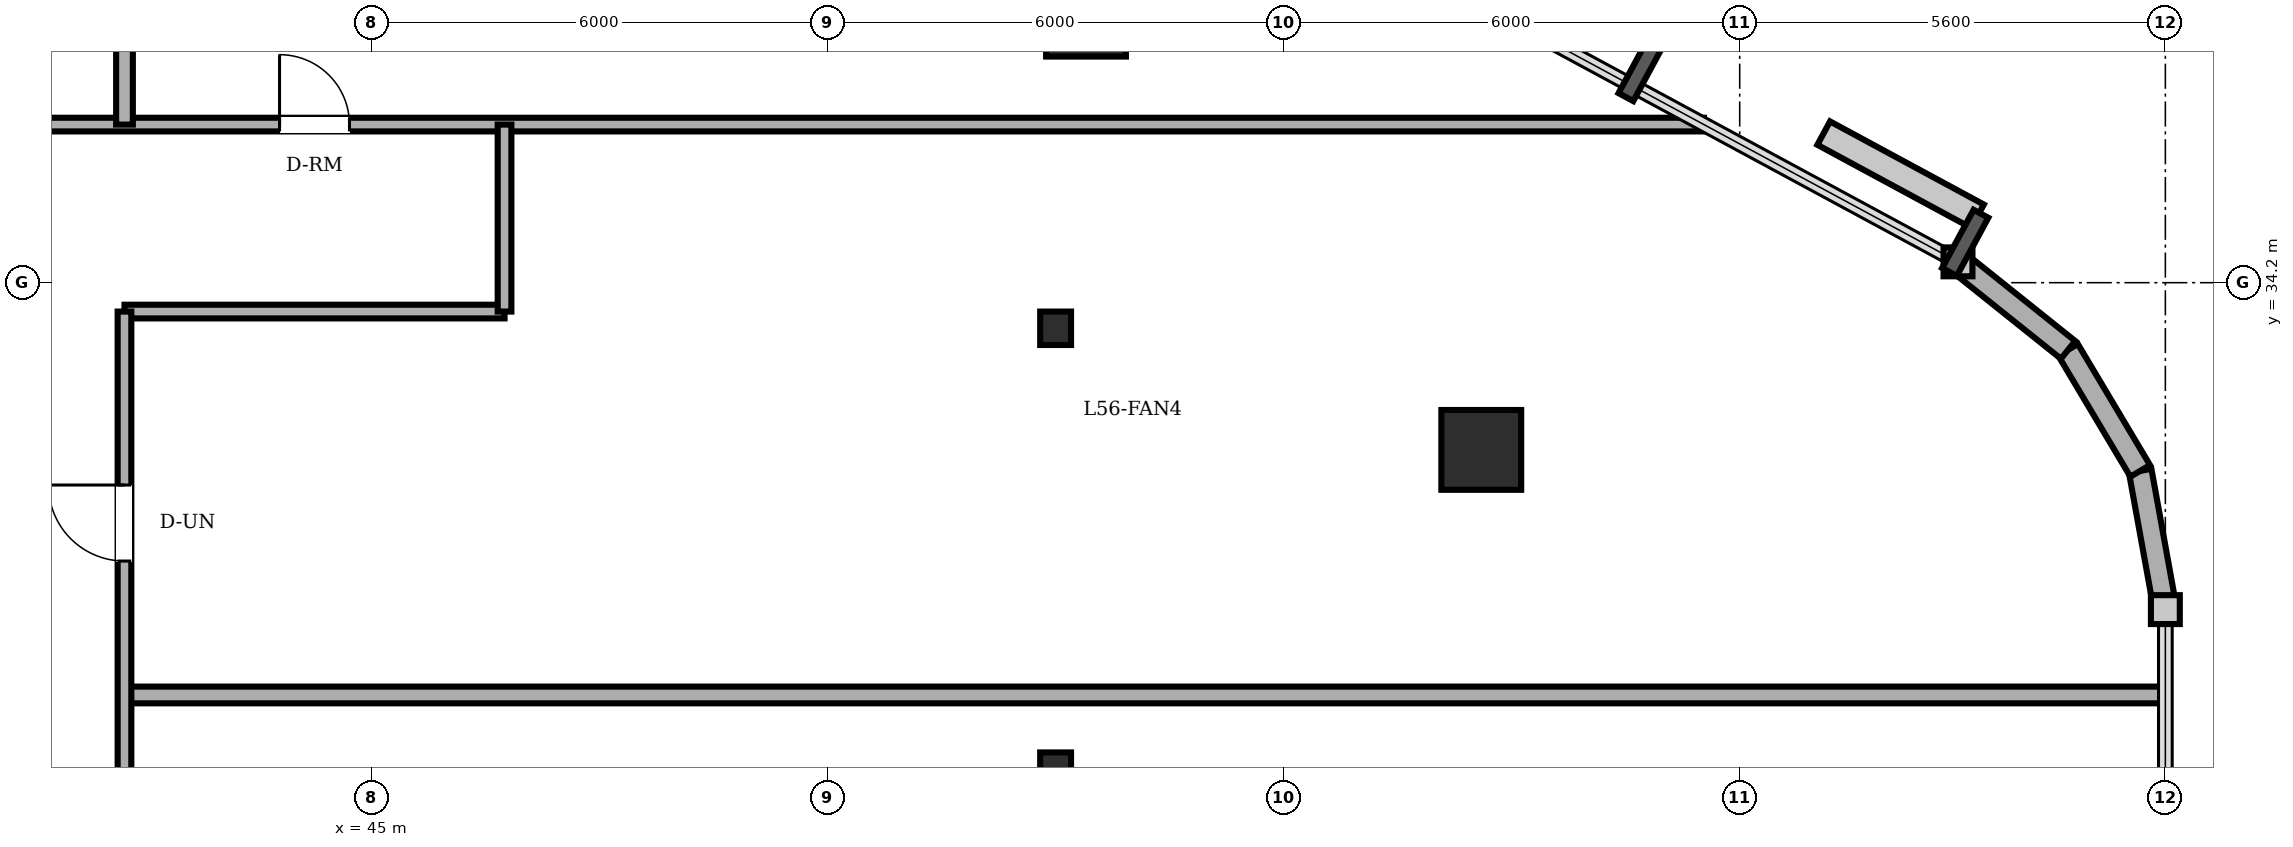
"""IFC4 building model, lengths in metres.
Left out: names, types, materials, properties, quantities, classifications, styles, units other than length and angle.
Written with IfcOpenShell. Run it as: python <this file> out.ifc"""

import sys

from ifc_helpers import new_model, si_unit, direction, frame, frame_2d, origin, origin_2d, place, context, subcontext, project, spatial, rectangle, circle, i_section, extrude, element, fill, save


model = new_model("IFC4")
c1 = context("Model", 3, precision=1e-05, world=origin(), true_north=direction((0.0, 1.0)))
c2 = subcontext(c1, "Body", "Model", "MODEL_VIEW")
j1 = project(units=[si_unit("LENGTHUNIT", "METRE"), si_unit("PLANEANGLEUNIT", "RADIAN")], contexts=[c1])
p1 = place(None, origin())
s1 = spatial("IfcSite", under=j1, at=p1, CompositionType="ELEMENT")
p2 = place(p1, origin())
s2 = spatial("IfcBuilding", under=s1, at=p2, CompositionType="ELEMENT")
p3 = place(p2, frame((0.0, 0.0, 215.7)))
s3 = spatial("IfcBuildingStorey", under=s2, at=p3, CompositionType="ELEMENT", Elevation=215.7)
for number, where, z_axis, x_axis in (
    (1, (59.6, 32.0, 0.0), (0.0, 0.0, 1.0), (1.0, 0.0, 0.0)),
    (2, (54.4, 37.7, 0.0), (0.0, 0.0, 1.0), (1.0, 0.0, 0.0)),
):
    element("IfcColumn", number, at=place(p3, frame(where, z_axis=z_axis, x_axis=x_axis)), inside=s3, PredefinedType="COLUMN", context=c2, shape_type="SweptSolid", body=[
        extrude(circle(Radius=0.525, at=origin_2d()), origin(), (0.0, 0.0, 1.0), 3.6),
    ])
for number, where, z_axis, x_axis in (
    (3, (54.0, 27.8, 0.0), (0.0, 0.0, 1.0), (1.0, 0.0, 0.0)),
    (4, (54.0, 33.6, 0.0), (0.0, 0.0, 1.0), (1.0, 0.0, 0.0)),
):
    element("IfcColumn", number, at=place(p3, frame(where, z_axis=z_axis, x_axis=x_axis)), inside=s3, PredefinedType="COLUMN", context=c2, shape_type="SweptSolid", body=[
        extrude(i_section(OverallWidth=0.406, OverallDepth=0.44, WebThickness=0.024, FlangeThickness=0.039, FilletRadius=0.015, at=origin_2d()), origin(), (0.0, 0.0, 1.0), 3.6),
    ])
p4 = place(p3, frame((68.6, 29.899, 0.0), z_axis=(0.0, 0.0, 1.0), x_axis=(-0.178468469252, 0.983945631365, 0.0)))
e5 = element("IfcWall", 5, at=p4, inside=s3, PredefinedType="SOLIDWALL", context=c2, shape_type="SweptSolid", body=[
    extrude(rectangle(XDim=1.855, YDim=0.3, at=frame_2d((0.927, 0.0))), origin(), (0.0, 0.0, 1.0), 3.4),
])
p5 = place(p3, frame((68.269, 31.724, 0.0), z_axis=(0.0, 0.0, 1.0), x_axis=(-0.512072018927, 0.858942516955, 0.0)))
e6 = element("IfcWall", 6, at=p5, inside=s3, PredefinedType="SOLIDWALL", context=c2, shape_type="SweptSolid", body=[
    extrude(rectangle(XDim=1.853, YDim=0.3, at=frame_2d((0.927, 0.0))), origin(), (0.0, 0.0, 1.0), 3.4),
])
p6 = place(p3, frame((67.32, 33.316, 0.0), z_axis=(0.0, 0.0, 1.0), x_axis=(-0.780920189257, 0.624630817372, 0.0)))
e7 = element("IfcWall", 7, at=p6, inside=s3, PredefinedType="SOLIDWALL", context=c2, shape_type="SweptSolid", body=[
    extrude(rectangle(XDim=1.854, YDim=0.3, at=frame_2d((0.927, 0.0))), origin(), (0.0, 0.0, 1.0), 3.4),
])
p7 = place(p3, frame((41.75, 28.776, 0.0), z_axis=(0.0, 0.0, 1.0), x_axis=(1.0, 0.0, 0.0)))
e8 = element("IfcWall", 8, at=p7, inside=s3, PredefinedType="PARTITIONING", context=c2, shape_type="SweptSolid", body=[
    extrude(rectangle(XDim=26.85, YDim=0.22, at=frame_2d((13.425, 0.0))), origin(), (0.0, 0.0, 1.0), 3.4),
])
p8 = place(p3, frame((41.75, 33.82, 0.0), z_axis=(0.0, 0.0, 1.0), x_axis=(1.0, 0.0, 0.0)))
e9 = element("IfcWall", 9, at=p8, inside=s3, PredefinedType="PARTITIONING", context=c2, shape_type="SweptSolid", body=[
    extrude(rectangle(XDim=5.0, YDim=0.18, at=frame_2d((2.5, 0.0))), origin(), (0.0, 0.0, 1.0), 2.982),
])
p9 = place(p3, frame((17.677, 36.28, 0.0), z_axis=(0.0, 0.0, 1.0), x_axis=(1.0, 0.0, 0.0)))
e10 = element("IfcWall", 10, at=p9, inside=s3, PredefinedType="PARTITIONING", context=c2, shape_type="SweptSolid", body=[
    extrude(rectangle(XDim=44.853, YDim=0.18, at=frame_2d((22.427, 0.0))), origin(), (0.0, 0.0, 1.0), 3.4),
])
p10 = place(p9, frame((9.573, 0.0, 0.0)))
e11 = element("IfcOpeningElement", 11, at=p10, cuts=e10, PredefinedType="OPENING", context=c2, shape_type="SweptSolid", body=[
    extrude(rectangle(XDim=0.9, YDim=2.1, at=frame_2d((0.45, 1.05))), frame((0.0, 0.1, 0.0), z_axis=(0.0, -1.0, 0.0), x_axis=(1.0, 0.0, 0.0)), (0.0, 0.0, 1.0), 0.2),
])
p11 = place(p9, frame((13.193, 0.0, 0.0)))
e12 = element("IfcOpeningElement", 12, at=p11, cuts=e10, PredefinedType="OPENING", context=c2, shape_type="SweptSolid", body=[
    extrude(rectangle(XDim=0.86, YDim=2.1, at=frame_2d((0.43, 1.05))), frame((0.0, 0.1, 0.0), z_axis=(0.0, -1.0, 0.0), x_axis=(1.0, 0.0, 0.0)), (0.0, 0.0, 1.0), 0.2),
])
p12 = place(p9, frame((26.113, 0.0, 0.0)))
e13 = element("IfcOpeningElement", 13, at=p12, cuts=e10, PredefinedType="OPENING", context=c2, shape_type="SweptSolid", body=[
    extrude(rectangle(XDim=0.92, YDim=2.1, at=frame_2d((0.46, 1.05))), frame((0.0, 0.1, 0.0), z_axis=(0.0, -1.0, 0.0), x_axis=(1.0, 0.0, 0.0)), (0.0, 0.0, 1.0), 0.2),
])
p13 = place(p9, frame((4.063, 0.0, 0.0)))
e14 = element("IfcOpeningElement", 14, at=p13, cuts=e10, PredefinedType="OPENING", context=c2, shape_type="SweptSolid", body=[
    extrude(rectangle(XDim=0.92, YDim=2.1, at=frame_2d((0.46, 1.05))), frame((0.0, 0.1, 0.0), z_axis=(0.0, -1.0, 0.0), x_axis=(1.0, 0.0, 0.0)), (0.0, 0.0, 1.0), 0.2),
])
p14 = place(p9, frame((19.338, 0.0, 0.0)))
e15 = element("IfcOpeningElement", 15, at=p14, cuts=e10, PredefinedType="OPENING", context=c2, shape_type="SweptSolid", body=[
    extrude(rectangle(XDim=0.92, YDim=2.1, at=frame_2d((0.46, 1.05))), frame((0.0, 0.1, 0.0), z_axis=(0.0, -1.0, 0.0), x_axis=(1.0, 0.0, 0.0)), (0.0, 0.0, 1.0), 0.2),
])
p15 = place(p3, frame((41.75, 14.18, 0.0), z_axis=(0.0, 0.0, 1.0), x_axis=(0.0, 1.0, 0.0)))
e16 = element("IfcWall", 16, at=p15, inside=s3, PredefinedType="PARTITIONING", context=c2, shape_type="SweptSolid", body=[
    extrude(rectangle(XDim=19.64, YDim=0.18, at=frame_2d((9.82, 0.0))), origin(), (0.0, 0.0, 1.0), 3.4),
])
p16 = place(p15, frame((2.322, 0.0, 0.0)))
e17 = element("IfcOpeningElement", 17, at=p16, cuts=e16, PredefinedType="OPENING", context=c2, shape_type="SweptSolid", body=[
    extrude(rectangle(XDim=0.92, YDim=2.1, at=frame_2d((0.46, 1.05))), frame((0.0, 0.1, 0.0), z_axis=(0.0, -1.0, 0.0), x_axis=(1.0, 0.0, 0.0)), (0.0, 0.0, 1.0), 0.2),
])
p17 = place(p15, frame((6.517, 0.0, 0.0)))
e18 = element("IfcOpeningElement", 18, at=p17, cuts=e16, PredefinedType="OPENING", context=c2, shape_type="SweptSolid", body=[
    extrude(rectangle(XDim=0.92, YDim=2.1, at=frame_2d((0.46, 1.05))), frame((0.0, 0.1, 0.0), z_axis=(0.0, -1.0, 0.0), x_axis=(1.0, 0.0, 0.0)), (0.0, 0.0, 1.0), 0.2),
])
p18 = place(p15, frame((11.293, 0.0, 0.0)))
e19 = element("IfcOpeningElement", 19, at=p18, cuts=e16, PredefinedType="OPENING", context=c2, shape_type="SweptSolid", body=[
    extrude(rectangle(XDim=0.92, YDim=2.1, at=frame_2d((0.46, 1.05))), frame((0.0, 0.1, 0.0), z_axis=(0.0, -1.0, 0.0), x_axis=(1.0, 0.0, 0.0)), (0.0, 0.0, 1.0), 0.2),
])
p19 = place(p15, frame((16.358, 0.0, 0.0)))
e20 = element("IfcOpeningElement", 20, at=p19, cuts=e16, PredefinedType="OPENING", context=c2, shape_type="SweptSolid", body=[
    extrude(rectangle(XDim=1.0, YDim=2.15, at=frame_2d((0.5, 1.075))), frame((0.0, 0.1, 0.0), z_axis=(0.0, -1.0, 0.0), x_axis=(1.0, 0.0, 0.0)), (0.0, 0.0, 1.0), 0.2),
])
p20 = place(p3, frame((41.75, 36.28, 0.0), z_axis=(0.0, 0.0, 1.0), x_axis=(0.0, 1.0, 0.0)))
e21 = element("IfcWall", 21, at=p20, inside=s3, PredefinedType="PARTITIONING", context=c2, shape_type="SweptSolid", body=[
    extrude(rectangle(XDim=3.42, YDim=0.22, at=frame_2d((1.71, 0.0))), origin(), (0.0, 0.0, 1.0), 3.4),
])
p21 = place(p3, frame((46.75, 33.82, 0.0), z_axis=(0.0, 0.0, 1.0), x_axis=(0.0, 1.0, 0.0)))
e22 = element("IfcWall", 22, at=p21, inside=s3, PredefinedType="PARTITIONING", context=c2, shape_type="SweptSolid", body=[
    extrude(rectangle(XDim=2.46, YDim=0.18, at=frame_2d((1.23, 0.0))), origin(), (0.0, 0.0, 1.0), 3.4),
])
p22 = place(p19, origin())
e23 = element("IfcDoor", 23, at=p22, inside=s3, OperationType="SINGLE_SWING_RIGHT", PredefinedType="DOOR", context=c2, shape_type="SweptSolid", body=[
    extrude(rectangle(XDim=1.0, YDim=2.15, at=frame_2d((0.5, 1.075))), frame((0.0, 0.025, 0.0), z_axis=(0.0, -1.0, 0.0), x_axis=(1.0, 0.0, 0.0)), (0.0, 0.0, 1.0), 0.05),
])
fill(e20, e23)
p23 = place(p12, origin())
e24 = element("IfcDoor", 24, at=p23, inside=s3, OperationType="SINGLE_SWING_LEFT", PredefinedType="DOOR", context=c2, shape_type="SweptSolid", body=[
    extrude(rectangle(XDim=0.92, YDim=2.1, at=frame_2d((0.46, 1.05))), frame((0.0, 0.025, 0.0), z_axis=(0.0, -1.0, 0.0), x_axis=(1.0, 0.0, 0.0)), (0.0, 0.0, 1.0), 0.05),
])
fill(e13, e24)
save(model, sys.argv[1])
